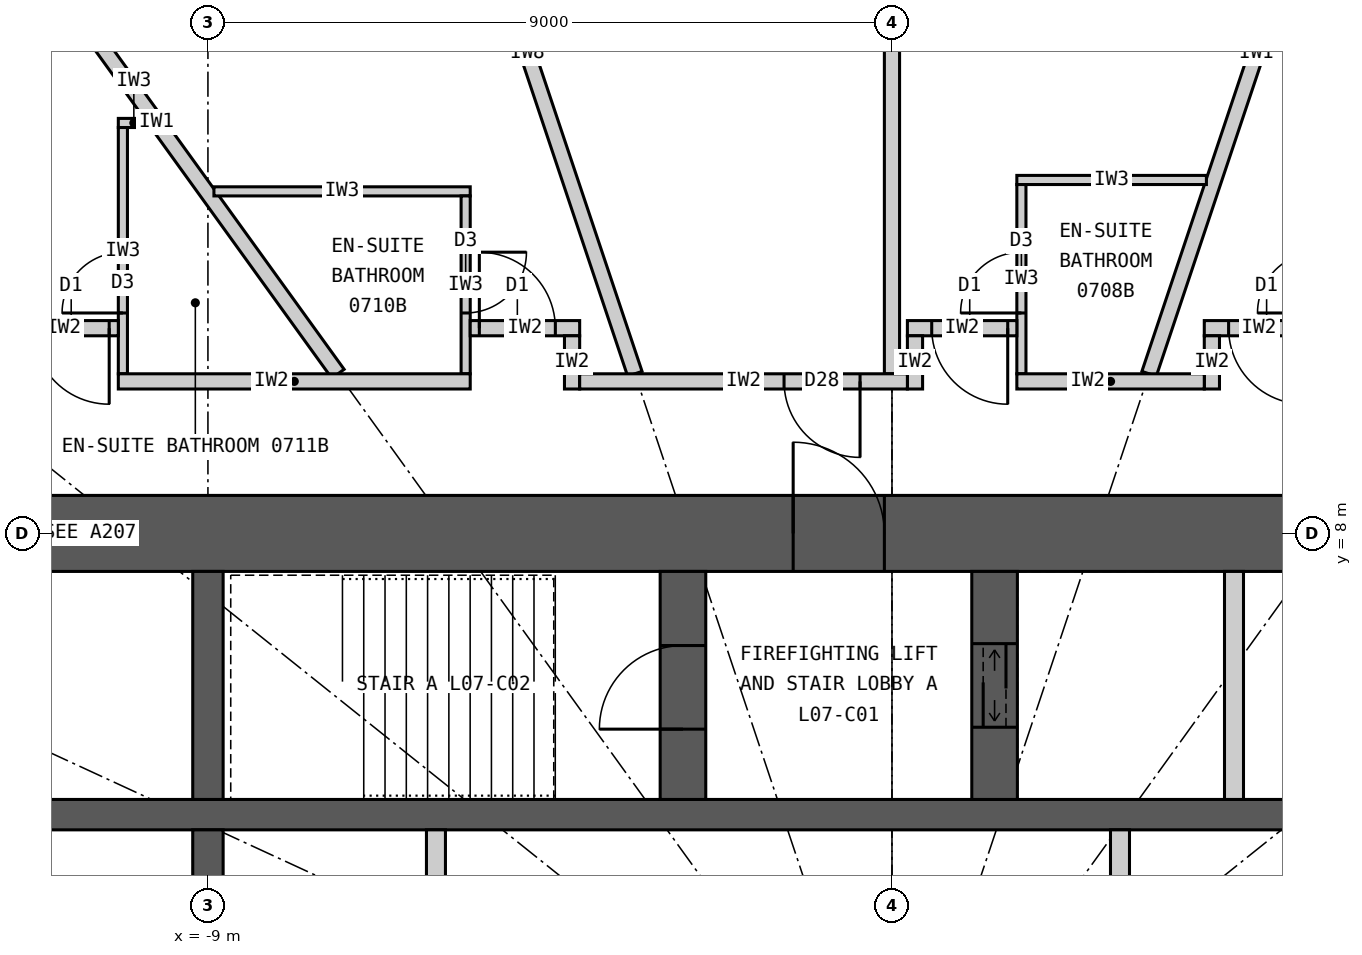
"""IFC4 building model, lengths in metres.
Left out: names, types, materials, properties, quantities, classifications, styles, units other than length and angle.
Written with IfcOpenShell. Run it as: python <this file> out.ifc"""

import sys

from ifc_helpers import new_model, si_unit, direction, frame, frame_2d, origin, place, context, subcontext, project, spatial, rectangle, extrude, element, fill, save


model = new_model("IFC4")
c1 = context("Model", 3, precision=1e-05, world=origin(), true_north=direction((0.0, 1.0)))
c2 = subcontext(c1, "Body", "Model", "MODEL_VIEW")
j1 = project(units=[si_unit("LENGTHUNIT", "METRE"), si_unit("PLANEANGLEUNIT", "RADIAN")], contexts=[c1])
p1 = place(None, origin())
s1 = spatial("IfcSite", under=j1, at=p1, CompositionType="ELEMENT")
p2 = place(p1, origin())
s2 = spatial("IfcBuilding", under=s1, at=p2, CompositionType="ELEMENT")
p3 = place(p2, frame((0.0, 0.0, 36.0)))
s3 = spatial("IfcBuildingStorey", under=s2, at=p3, CompositionType="ELEMENT", Elevation=36.0)
p4 = place(p3, frame((-12.5, 8.0, 0.0), z_axis=(0.0, 0.0, 1.0), x_axis=(1.0, 0.0, 0.0)))
e1 = element("IfcWall", 1, at=p4, inside=s3, PredefinedType="SHEAR", context=c2, shape_type="SweptSolid", body=[
    extrude(rectangle(XDim=25.0, YDim=1.0, at=frame_2d((12.5, 0.0))), origin(), (0.0, 0.0, 1.0), 3.3),
])
p5 = place(p4, frame((11.2, 0.0, 0.0)))
e2 = element("IfcOpeningElement", 2, at=p5, cuts=e1, PredefinedType="OPENING", context=c2, shape_type="SweptSolid", body=[
    extrude(rectangle(XDim=1.2, YDim=2.2, at=frame_2d((0.6, 1.1))), frame((0.0, 0.51, 0.0), z_axis=(0.0, -1.0, 0.0), x_axis=(1.0, 0.0, 0.0)), (0.0, 0.0, 1.0), 1.02),
])
p6 = place(p4, frame((18.8, 0.0, 0.0)))
e3 = element("IfcOpeningElement", 3, at=p6, cuts=e1, PredefinedType="OPENING", context=c2, shape_type="SweptSolid", body=[
    extrude(rectangle(XDim=0.9, YDim=2.2, at=frame_2d((0.45, 1.1))), frame((0.0, 0.51, 0.0), z_axis=(0.0, -1.0, 0.0), x_axis=(1.0, 0.0, 0.0)), (0.0, 0.0, 1.0), 1.02),
])
p7 = place(p3, frame((-11.5, 4.3, 0.0), z_axis=(0.0, 0.0, 1.0), x_axis=(1.0, 0.0, 0.0)))
e4 = element("IfcWall", 4, at=p7, inside=s3, PredefinedType="SHEAR", context=c2, shape_type="SweptSolid", body=[
    extrude(rectangle(XDim=23.0, YDim=0.4, at=frame_2d((11.5, 0.0))), origin(), (0.0, 0.0, 1.0), 3.3),
])
p8 = place(p3, frame((-9.0, 4.5, 0.0), z_axis=(0.0, 0.0, 1.0), x_axis=(0.0, 1.0, 0.0)))
e5 = element("IfcWall", 5, at=p8, inside=s3, PredefinedType="SHEAR", context=c2, shape_type="SweptSolid", body=[
    extrude(rectangle(XDim=3.0, YDim=0.4, at=frame_2d((1.5, 0.0))), origin(), (0.0, 0.0, 1.0), 3.3),
])
p9 = place(p3, frame((-9.0, 1.75, 0.0), z_axis=(0.0, 0.0, 1.0), x_axis=(0.0, 1.0, 0.0)))
e6 = element("IfcWall", 6, at=p9, inside=s3, PredefinedType="SHEAR", context=c2, shape_type="SweptSolid", body=[
    extrude(rectangle(XDim=2.35, YDim=0.4, at=frame_2d((1.175, 0.0))), origin(), (0.0, 0.0, 1.0), 3.3),
])
p10 = place(p3, frame((-2.75, 4.5, 0.0), z_axis=(0.0, 0.0, 1.0), x_axis=(0.0, 1.0, 0.0)))
e7 = element("IfcWall", 7, at=p10, inside=s3, PredefinedType="SHEAR", context=c2, shape_type="SweptSolid", body=[
    extrude(rectangle(XDim=3.0, YDim=0.6, at=frame_2d((1.5, 0.0))), origin(), (0.0, 0.0, 1.0), 3.3),
])
p11 = place(p10, frame((0.925, 0.0, 0.0)))
e8 = element("IfcOpeningElement", 8, at=p11, cuts=e7, PredefinedType="OPENING", context=c2, shape_type="SweptSolid", body=[
    extrude(rectangle(XDim=1.1, YDim=2.2, at=frame_2d((0.55, 1.1))), frame((0.0, 0.31, 0.0), z_axis=(0.0, -1.0, 0.0), x_axis=(1.0, 0.0, 0.0)), (0.0, 0.0, 1.0), 0.62),
])
p12 = place(p3, frame((1.35, 4.5, 0.0), z_axis=(0.0, 0.0, 1.0), x_axis=(0.0, 1.0, 0.0)))
e9 = element("IfcWall", 9, at=p12, inside=s3, PredefinedType="SHEAR", context=c2, shape_type="SweptSolid", body=[
    extrude(rectangle(XDim=3.0, YDim=0.6, at=frame_2d((1.5, 0.0))), origin(), (0.0, 0.0, 1.0), 3.3),
])
p13 = place(p12, frame((0.95, 0.0, 0.0)))
e10 = element("IfcOpeningElement", 10, at=p13, cuts=e9, PredefinedType="OPENING", context=c2, shape_type="SweptSolid", body=[
    extrude(rectangle(XDim=1.1, YDim=2.2, at=frame_2d((0.55, 1.1))), frame((0.0, 0.31, 0.0), z_axis=(0.0, -1.0, 0.0), x_axis=(1.0, 0.0, 0.0)), (0.0, 0.0, 1.0), 0.62),
])
p14 = place(p3, frame((4.5, 4.5, 0.0), z_axis=(0.0, 0.0, 1.0), x_axis=(0.0, 1.0, 0.0)))
e11 = element("IfcWall", 11, at=p14, inside=s3, PredefinedType="PARTITIONING", context=c2, shape_type="SweptSolid", body=[
    extrude(rectangle(XDim=3.0, YDim=0.25, at=frame_2d((1.5, 0.0))), origin(), (0.0, 0.0, 1.0), 3.3),
])
for number, where, z_axis, x_axis in (
    (12, (-6.0, 1.75, 0.0), (0.0, 0.0, 1.0), (0.0, 1.0, 0.0)),
    (13, (3.0, 1.75, 0.0), (0.0, 0.0, 1.0), (0.0, 1.0, 0.0)),
):
    element("IfcWall", number, at=place(p3, frame(where, z_axis=z_axis, x_axis=x_axis)), inside=s3, PredefinedType="PARTITIONING", context=c2, shape_type="SweptSolid", body=[
        extrude(rectangle(XDim=2.35, YDim=0.25, at=frame_2d((1.175, 0.0))), origin(), (0.0, 0.0, 1.0), 3.3),
    ])
p15 = place(p3, frame((3.383, 10.1, 0.0), z_axis=(0.0, 0.0, 1.0), x_axis=(0.317593727596, 0.948226884344, 0.0)))
e14 = element("IfcWall", 14, at=p15, inside=s3, PredefinedType="PARTITIONING", context=c2, shape_type="SweptSolid", body=[
    extrude(rectangle(XDim=8.899, YDim=0.2, at=frame_2d((4.449, 0.0))), origin(), (0.0, 0.0, 1.0), 2.32),
])
p16 = place(p3, frame((0.0, 10.1, 0.0), z_axis=(0.0, 0.0, 1.0), x_axis=(0.0, 1.0, 0.0)))
e15 = element("IfcWall", 15, at=p16, inside=s3, PredefinedType="PARTITIONING", context=c2, shape_type="SweptSolid", body=[
    extrude(rectangle(XDim=9.05, YDim=0.2, at=frame_2d((4.525, 0.0))), origin(), (0.0, 0.0, 1.0), 2.32),
])
p17 = place(p3, frame((-3.383, 10.1, 0.0), z_axis=(0.0, 0.0, 1.0), x_axis=(-0.317593727596, 0.948226884344, 0.0)))
e16 = element("IfcWall", 16, at=p17, inside=s3, PredefinedType="PARTITIONING", context=c2, shape_type="SweptSolid", body=[
    extrude(rectangle(XDim=8.899, YDim=0.2, at=frame_2d((4.449, 0.0))), origin(), (0.0, 0.0, 1.0), 2.32),
])
p18 = place(p3, frame((-7.289, 10.1, 0.0), z_axis=(0.0, 0.0, 1.0), x_axis=(-0.585216319319, 0.810877216108, 0.0)))
e17 = element("IfcWall", 17, at=p18, inside=s3, PredefinedType="PARTITIONING", context=c2, shape_type="SweptSolid", body=[
    extrude(rectangle(XDim=8.16, YDim=0.2, at=frame_2d((4.08, 0.0))), origin(), (0.0, 0.0, 1.0), 2.32),
])
p19 = place(p3, frame((4.137, 12.65, 0.0), z_axis=(0.0, 0.0, 1.0), x_axis=(-1.0, 0.0, 0.0)))
e18 = element("IfcWall", 18, at=p19, inside=s3, PredefinedType="PARTITIONING", context=c2, shape_type="SweptSolid", body=[
    extrude(rectangle(XDim=2.494, YDim=0.12, at=frame_2d((1.247, 0.0))), origin(), (0.0, 0.0, 1.0), 3.12),
])
p20 = place(p3, frame((1.703, 10.1, 0.0), z_axis=(0.0, 0.0, 1.0), x_axis=(0.0, 1.0, 0.0)))
e19 = element("IfcWall", 19, at=p20, inside=s3, PredefinedType="PARTITIONING", context=c2, shape_type="SweptSolid", body=[
    extrude(rectangle(XDim=2.49, YDim=0.12, at=frame_2d((1.245, 0.0))), origin(), (0.0, 0.0, 1.0), 3.12),
])
p21 = place(p20, frame((0.8, 0.0, 0.0)))
e20 = element("IfcOpeningElement", 20, at=p21, cuts=e19, PredefinedType="OPENING", context=c2, shape_type="SweptSolid", body=[
    extrude(rectangle(XDim=0.8, YDim=2.1, at=frame_2d((0.4, 1.05))), frame((0.0, 0.07, 0.0), z_axis=(0.0, -1.0, 0.0), x_axis=(1.0, 0.0, 0.0)), (0.0, 0.0, 1.0), 0.14),
])
p22 = place(p3, frame((-8.921, 12.5, 0.0), z_axis=(0.0, 0.0, 1.0), x_axis=(1.0, 0.0, 0.0)))
e21 = element("IfcWall", 21, at=p22, inside=s3, PredefinedType="PARTITIONING", context=c2, shape_type="SweptSolid", body=[
    extrude(rectangle(XDim=3.372, YDim=0.12, at=frame_2d((1.686, 0.0))), origin(), (0.0, 0.0, 1.0), 3.12),
])
p23 = place(p3, frame((-5.609, 10.1, 0.0), z_axis=(0.0, 0.0, 1.0), x_axis=(0.0, 1.0, 0.0)))
e22 = element("IfcWall", 22, at=p23, inside=s3, PredefinedType="PARTITIONING", context=c2, shape_type="SweptSolid", body=[
    extrude(rectangle(XDim=2.34, YDim=0.12, at=frame_2d((1.17, 0.0))), origin(), (0.0, 0.0, 1.0), 3.12),
])
p24 = place(p23, frame((0.8, 0.0, 0.0)))
e23 = element("IfcOpeningElement", 23, at=p24, cuts=e22, PredefinedType="OPENING", context=c2, shape_type="SweptSolid", body=[
    extrude(rectangle(XDim=0.8, YDim=2.1, at=frame_2d((0.4, 1.05))), frame((0.0, 0.07, 0.0), z_axis=(0.0, -1.0, 0.0), x_axis=(1.0, 0.0, 0.0)), (0.0, 0.0, 1.0), 0.14),
])
p25 = place(p3, frame((-9.771, 13.4, 0.0), z_axis=(0.0, 0.0, 1.0), x_axis=(-1.0, 0.0, 0.0)))
e24 = element("IfcWall", 24, at=p25, inside=s3, PredefinedType="PARTITIONING", context=c2, shape_type="SweptSolid", body=[
    extrude(rectangle(XDim=0.408, YDim=0.12, at=frame_2d((0.204, 0.0))), origin(), (0.0, 0.0, 1.0), 3.12),
])
p26 = place(p3, frame((-10.119, 10.1, 0.0), z_axis=(0.0, 0.0, 1.0), x_axis=(0.0, 1.0, 0.0)))
e25 = element("IfcWall", 25, at=p26, inside=s3, PredefinedType="PARTITIONING", context=c2, shape_type="SweptSolid", body=[
    extrude(rectangle(XDim=3.24, YDim=0.12, at=frame_2d((1.62, 0.0))), origin(), (0.0, 0.0, 1.0), 3.12),
])
p27 = place(p26, frame((0.8, 0.0, 0.0)))
e26 = element("IfcOpeningElement", 26, at=p27, cuts=e25, PredefinedType="OPENING", context=c2, shape_type="SweptSolid", body=[
    extrude(rectangle(XDim=0.8, YDim=2.1, at=frame_2d((0.4, 1.05))), frame((0.0, 0.07, 0.0), z_axis=(0.0, -1.0, 0.0), x_axis=(1.0, 0.0, 0.0)), (0.0, 0.0, 1.0), 0.14),
])
p28 = place(p3, frame((4.109, 10.7, 0.0), z_axis=(0.0, 0.0, 1.0), x_axis=(1.0, 0.0, 0.0)))
e27 = element("IfcWall", 27, at=p28, inside=s3, PredefinedType="PARTITIONING", context=c2, shape_type="SweptSolid", body=[
    extrude(rectangle(XDim=1.44, YDim=0.2, at=frame_2d((0.72, 0.0))), origin(), (0.0, 0.0, 1.0), 3.12),
])
p29 = place(p28, frame((0.32, 0.0, 0.0)))
e28 = element("IfcOpeningElement", 28, at=p29, cuts=e27, PredefinedType="OPENING", context=c2, shape_type="SweptSolid", body=[
    extrude(rectangle(XDim=1.0, YDim=2.2, at=frame_2d((0.5, 1.1))), frame((0.0, 0.11, 0.0), z_axis=(0.0, -1.0, 0.0), x_axis=(1.0, 0.0, 0.0)), (0.0, 0.0, 1.0), 0.22),
])
p30 = place(p3, frame((4.209, 9.9, 0.0), z_axis=(0.0, 0.0, 1.0), x_axis=(0.0, 1.0, 0.0)))
e29 = element("IfcWall", 29, at=p30, inside=s3, PredefinedType="PARTITIONING", context=c2, shape_type="SweptSolid", body=[
    extrude(rectangle(XDim=0.7, YDim=0.2, at=frame_2d((0.35, 0.0))), origin(), (0.0, 0.0, 1.0), 3.12),
])
p31 = place(p3, frame((0.203, 10.7, 0.0), z_axis=(0.0, 0.0, 1.0), x_axis=(1.0, 0.0, 0.0)))
e30 = element("IfcWall", 30, at=p31, inside=s3, PredefinedType="PARTITIONING", context=c2, shape_type="SweptSolid", body=[
    extrude(rectangle(XDim=1.44, YDim=0.2, at=frame_2d((0.72, 0.0))), origin(), (0.0, 0.0, 1.0), 3.12),
])
p32 = place(p31, frame((0.32, 0.0, 0.0)))
e31 = element("IfcOpeningElement", 31, at=p32, cuts=e30, PredefinedType="OPENING", context=c2, shape_type="SweptSolid", body=[
    extrude(rectangle(XDim=1.0, YDim=2.2, at=frame_2d((0.5, 1.1))), frame((0.0, 0.11, 0.0), z_axis=(0.0, -1.0, 0.0), x_axis=(1.0, 0.0, 0.0)), (0.0, 0.0, 1.0), 0.22),
])
p33 = place(p3, frame((0.303, 9.9, 0.0), z_axis=(0.0, 0.0, 1.0), x_axis=(0.0, 1.0, 0.0)))
e32 = element("IfcWall", 32, at=p33, inside=s3, PredefinedType="PARTITIONING", context=c2, shape_type="SweptSolid", body=[
    extrude(rectangle(XDim=0.7, YDim=0.2, at=frame_2d((0.35, 0.0))), origin(), (0.0, 0.0, 1.0), 3.12),
])
p34 = place(p3, frame((-5.549, 10.7, 0.0), z_axis=(0.0, 0.0, 1.0), x_axis=(1.0, 0.0, 0.0)))
e33 = element("IfcWall", 33, at=p34, inside=s3, PredefinedType="PARTITIONING", context=c2, shape_type="SweptSolid", body=[
    extrude(rectangle(XDim=1.44, YDim=0.2, at=frame_2d((0.72, 0.0))), origin(), (0.0, 0.0, 1.0), 3.12),
])
p35 = place(p34, frame((0.12, 0.0, 0.0)))
e34 = element("IfcOpeningElement", 34, at=p35, cuts=e33, PredefinedType="OPENING", context=c2, shape_type="SweptSolid", body=[
    extrude(rectangle(XDim=1.0, YDim=2.2, at=frame_2d((0.5, 1.1))), frame((0.0, 0.11, 0.0), z_axis=(0.0, -1.0, 0.0), x_axis=(1.0, 0.0, 0.0)), (0.0, 0.0, 1.0), 0.22),
])
p36 = place(p3, frame((-4.209, 9.9, 0.0), z_axis=(0.0, 0.0, 1.0), x_axis=(0.0, 1.0, 0.0)))
e35 = element("IfcWall", 35, at=p36, inside=s3, PredefinedType="PARTITIONING", context=c2, shape_type="SweptSolid", body=[
    extrude(rectangle(XDim=0.7, YDim=0.2, at=frame_2d((0.35, 0.0))), origin(), (0.0, 0.0, 1.0), 3.12),
])
p37 = place(p3, frame((-11.619, 10.7, 0.0), z_axis=(0.0, 0.0, 1.0), x_axis=(1.0, 0.0, 0.0)))
e36 = element("IfcWall", 36, at=p37, inside=s3, PredefinedType="PARTITIONING", context=c2, shape_type="SweptSolid", body=[
    extrude(rectangle(XDim=1.44, YDim=0.2, at=frame_2d((0.72, 0.0))), origin(), (0.0, 0.0, 1.0), 3.12),
])
p38 = place(p37, frame((0.32, 0.0, 0.0)))
e37 = element("IfcOpeningElement", 37, at=p38, cuts=e36, PredefinedType="OPENING", context=c2, shape_type="SweptSolid", body=[
    extrude(rectangle(XDim=1.0, YDim=2.2, at=frame_2d((0.5, 1.1))), frame((0.0, 0.11, 0.0), z_axis=(0.0, -1.0, 0.0), x_axis=(1.0, 0.0, 0.0)), (0.0, 0.0, 1.0), 0.22),
])
p39 = place(p3, frame((-10.179, 10.0, 0.0), z_axis=(0.0, 0.0, 1.0), x_axis=(1.0, 0.0, 0.0)))
e38 = element("IfcWall", 38, at=p39, inside=s3, PredefinedType="PARTITIONING", context=c2, shape_type="SweptSolid", body=[
    extrude(rectangle(XDim=4.63, YDim=0.2, at=frame_2d((2.315, 0.0))), origin(), (0.0, 0.0, 1.0), 3.12),
])
p40 = place(p3, frame((-4.109, 10.0, 0.0), z_axis=(0.0, 0.0, 1.0), x_axis=(1.0, 0.0, 0.0)))
e39 = element("IfcWall", 39, at=p40, inside=s3, PredefinedType="PARTITIONING", context=c2, shape_type="SweptSolid", body=[
    extrude(rectangle(XDim=4.312, YDim=0.2, at=frame_2d((2.156, 0.0))), origin(), (0.0, 0.0, 1.0), 3.12),
])
p41 = place(p40, frame((2.689, 0.0, 0.0)))
e40 = element("IfcOpeningElement", 40, at=p41, cuts=e39, PredefinedType="OPENING", context=c2, shape_type="SweptSolid", body=[
    extrude(rectangle(XDim=1.0, YDim=2.2, at=frame_2d((0.5, 1.1))), frame((0.0, 0.11, 0.0), z_axis=(0.0, -1.0, 0.0), x_axis=(1.0, 0.0, 0.0)), (0.0, 0.0, 1.0), 0.22),
])
p42 = place(p3, frame((1.643, 10.0, 0.0), z_axis=(0.0, 0.0, 1.0), x_axis=(1.0, 0.0, 0.0)))
e41 = element("IfcWall", 41, at=p42, inside=s3, PredefinedType="PARTITIONING", context=c2, shape_type="SweptSolid", body=[
    extrude(rectangle(XDim=2.466, YDim=0.2, at=frame_2d((1.233, 0.0))), origin(), (0.0, 0.0, 1.0), 3.12),
])
p43 = place(p29, origin())
e42 = element("IfcDoor", 42, at=p43, inside=s3, OperationType="SINGLE_SWING_RIGHT", PredefinedType="DOOR", context=c2, shape_type="SweptSolid", body=[
    extrude(rectangle(XDim=1.0, YDim=2.2, at=frame_2d((0.5, 1.1))), frame((0.0, 0.025, 0.0), z_axis=(0.0, -1.0, 0.0), x_axis=(1.0, 0.0, 0.0)), (0.0, 0.0, 1.0), 0.05),
])
fill(e28, e42)
p44 = place(p21, origin())
e43 = element("IfcDoor", 43, at=p44, inside=s3, OperationType="SINGLE_SWING_LEFT", PredefinedType="DOOR", context=c2, shape_type="SweptSolid", body=[
    extrude(rectangle(XDim=0.8, YDim=2.1, at=frame_2d((0.4, 1.05))), frame((0.0, 0.025, 0.0), z_axis=(0.0, -1.0, 0.0), x_axis=(1.0, 0.0, 0.0)), (0.0, 0.0, 1.0), 0.05),
])
fill(e20, e43)
p45 = place(p32, origin())
e44 = element("IfcDoor", 44, at=p45, inside=s3, OperationType="SINGLE_SWING_RIGHT", PredefinedType="DOOR", context=c2, shape_type="SweptSolid", body=[
    extrude(rectangle(XDim=1.0, YDim=2.2, at=frame_2d((0.5, 1.1))), frame((0.0, 0.025, 0.0), z_axis=(0.0, -1.0, 0.0), x_axis=(1.0, 0.0, 0.0)), (0.0, 0.0, 1.0), 0.05),
])
fill(e31, e44)
p46 = place(p41, origin())
e45 = element("IfcDoor", 45, at=p46, inside=s3, OperationType="SINGLE_SWING_RIGHT", PredefinedType="DOOR", context=c2, shape_type="SweptSolid", body=[
    extrude(rectangle(XDim=1.0, YDim=2.2, at=frame_2d((0.5, 1.1))), frame((0.0, 0.025, 0.0), z_axis=(0.0, -1.0, 0.0), x_axis=(1.0, 0.0, 0.0)), (0.0, 0.0, 1.0), 0.05),
])
fill(e40, e45)
p47 = place(p24, origin())
e46 = element("IfcDoor", 46, at=p47, inside=s3, OperationType="SINGLE_SWING_RIGHT", PredefinedType="DOOR", context=c2, shape_type="SweptSolid", body=[
    extrude(rectangle(XDim=0.8, YDim=2.1, at=frame_2d((0.4, 1.05))), frame((0.0, 0.025, 0.0), z_axis=(0.0, -1.0, 0.0), x_axis=(1.0, 0.0, 0.0)), (0.0, 0.0, 1.0), 0.05),
])
fill(e23, e46)
p48 = place(p35, origin())
e47 = element("IfcDoor", 47, at=p48, inside=s3, OperationType="SINGLE_SWING_LEFT", PredefinedType="DOOR", context=c2, shape_type="SweptSolid", body=[
    extrude(rectangle(XDim=1.0, YDim=2.2, at=frame_2d((0.5, 1.1))), frame((0.0, 0.025, 0.0), z_axis=(0.0, -1.0, 0.0), x_axis=(1.0, 0.0, 0.0)), (0.0, 0.0, 1.0), 0.05),
])
fill(e34, e47)
p49 = place(p27, origin())
e48 = element("IfcDoor", 48, at=p49, inside=s3, OperationType="SINGLE_SWING_LEFT", PredefinedType="DOOR", context=c2, shape_type="SweptSolid", body=[
    extrude(rectangle(XDim=0.8, YDim=2.1, at=frame_2d((0.4, 1.05))), frame((0.0, 0.025, 0.0), z_axis=(0.0, -1.0, 0.0), x_axis=(1.0, 0.0, 0.0)), (0.0, 0.0, 1.0), 0.05),
])
fill(e26, e48)
p50 = place(p38, origin())
e49 = element("IfcDoor", 49, at=p50, inside=s3, OperationType="SINGLE_SWING_RIGHT", PredefinedType="DOOR", context=c2, shape_type="SweptSolid", body=[
    extrude(rectangle(XDim=1.0, YDim=2.2, at=frame_2d((0.5, 1.1))), frame((0.0, 0.025, 0.0), z_axis=(0.0, -1.0, 0.0), x_axis=(1.0, 0.0, 0.0)), (0.0, 0.0, 1.0), 0.05),
])
fill(e37, e49)
p51 = place(p5, origin())
e50 = element("IfcDoor", 50, at=p51, inside=s3, OperationType="SINGLE_SWING_LEFT", PredefinedType="DOOR", context=c2, shape_type="SweptSolid", body=[
    extrude(rectangle(XDim=1.2, YDim=2.2, at=frame_2d((0.6, 1.1))), frame((0.0, 0.025, 0.0), z_axis=(0.0, -1.0, 0.0), x_axis=(1.0, 0.0, 0.0)), (0.0, 0.0, 1.0), 0.05),
])
fill(e2, e50)
p52 = place(p11, origin())
e51 = element("IfcDoor", 51, at=p52, inside=s3, OperationType="SINGLE_SWING_LEFT", PredefinedType="DOOR", context=c2, shape_type="SweptSolid", body=[
    extrude(rectangle(XDim=1.1, YDim=2.2, at=frame_2d((0.55, 1.1))), frame((0.0, 0.025, 0.0), z_axis=(0.0, -1.0, 0.0), x_axis=(1.0, 0.0, 0.0)), (0.0, 0.0, 1.0), 0.05),
])
fill(e8, e51)
p53 = place(p13, origin())
e52 = element("IfcDoor", 52, at=p53, inside=s3, OperationType="DOUBLE_DOOR_SLIDING", PredefinedType="DOOR", context=c2, shape_type="SweptSolid", body=[
    extrude(rectangle(XDim=1.1, YDim=2.2, at=frame_2d((0.55, 1.1))), frame((0.0, 0.025, 0.0), z_axis=(0.0, -1.0, 0.0), x_axis=(1.0, 0.0, 0.0)), (0.0, 0.0, 1.0), 0.05),
])
fill(e10, e52)
save(model, sys.argv[1])
